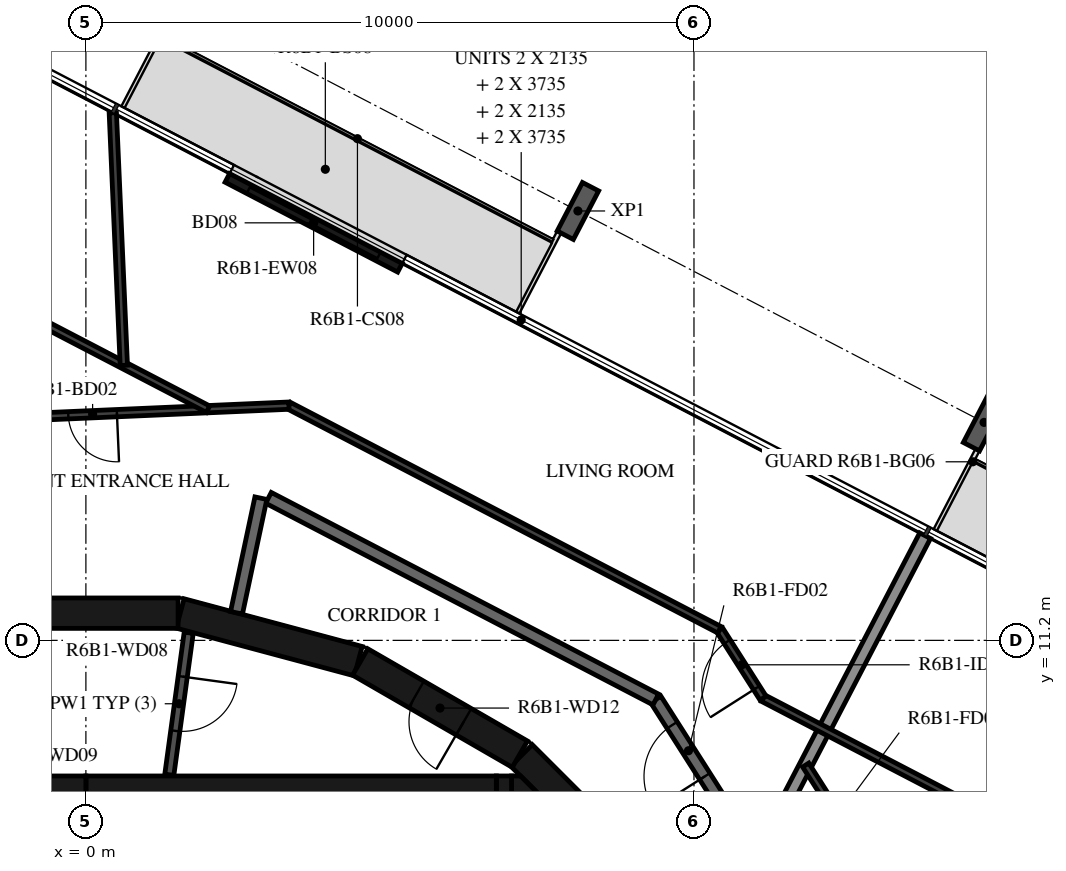
"""IFC4 building model, lengths in metres.
Left out: names, types, materials, properties, quantities, classifications, styles, units other than length and angle.
Written with IfcOpenShell. Run it as: python <this file> out.ifc"""

import sys

from ifc_helpers import new_model, si_unit, direction, frame, frame_2d, origin, origin_2d, place, context, subcontext, project, spatial, polyline, rectangle, i_section, outline, extrude, element, fill, save


model = new_model("IFC4")
c1 = context("Model", 3, precision=1e-05, world=origin(), true_north=direction((0.0, 1.0)))
c2 = subcontext(c1, "Body", "Model", "MODEL_VIEW")
j1 = project(units=[si_unit("LENGTHUNIT", "METRE"), si_unit("PLANEANGLEUNIT", "RADIAN")], contexts=[c1])
p1 = place(None, origin())
s1 = spatial("IfcSite", under=j1, at=p1, CompositionType="ELEMENT")
p2 = place(p1, origin())
s2 = spatial("IfcBuilding", under=s1, at=p2, CompositionType="ELEMENT")
p3 = place(p2, frame((0.0, 0.0, 237.2)))
s3 = spatial("IfcBuildingStorey", under=s2, at=p3, CompositionType="ELEMENT", Elevation=237.2)
for number, where, z_axis, x_axis in (
    (1, (14.771, 14.784, -0.38), (0.0, 0.0, 1.0), (0.887, -0.462, 0.0)),
    (2, (8.091, 18.261, -0.38), (0.0, 0.0, 1.0), (0.887, -0.462, 0.0)),
):
    element("IfcColumn", number, at=place(p3, frame(where, z_axis=z_axis, x_axis=x_axis)), inside=s3, PredefinedType="COLUMN", context=c2, shape_type="SweptSolid", body=[
        extrude(i_section(OverallWidth=0.3, OverallDepth=0.9, WebThickness=0.019, FlangeThickness=0.035, FilletRadius=0.03, at=origin_2d()), origin(), (0.0, 0.0, 1.0), 3.5),
    ])
p4 = place(p3, frame((5.164, 17.327, 0.0), z_axis=(0.0, 0.0, 1.0), x_axis=(-0.886983100078, 0.461801884119, 0.0)))
e3 = element("IfcWall", 3, at=p4, inside=s3, PredefinedType="STANDARD", context=c2, shape_type="SweptSolid", body=[
    extrude(rectangle(XDim=3.2, YDim=0.16, at=frame_2d((1.6, 0.0))), origin(), (0.0, 0.0, 1.0), 3.12),
])
p5 = place(p4, frame((0.4, 0.0, 0.0)))
e4 = element("IfcOpeningElement", 4, at=p5, cuts=e3, PredefinedType="OPENING", context=c2, shape_type="SweptSolid", body=[
    extrude(rectangle(XDim=2.4, YDim=2.4, at=frame_2d((1.2, 1.2))), frame((0.0, 0.09, 0.0), z_axis=(0.0, -1.0, 0.0), x_axis=(1.0, 0.0, 0.0)), (0.0, 0.0, 1.0), 0.18),
])
p6 = place(p3, frame((9.308, 7.164, 0.0), z_axis=(0.0, 0.0, 1.0), x_axis=(-0.707106781187, 0.707106781187, 0.0)))
e5 = element("IfcWall", 5, at=p6, inside=s3, PredefinedType="SHEAR", context=c2, shape_type="SweptSolid", body=[
    extrude(rectangle(XDim=3.032, YDim=0.5, at=frame_2d((1.516, 0.0))), origin(), (0.0, 0.0, 1.0), 3.12),
])
p7 = place(p6, frame((0.416, 0.0, 0.0)))
e6 = element("IfcOpeningElement", 6, at=p7, cuts=e5, PredefinedType="OPENING", context=c2, shape_type="SweptSolid", body=[
    extrude(rectangle(XDim=1.2, YDim=2.1, at=frame_2d((0.6, 1.05))), frame((0.0, 0.26, 0.0), z_axis=(0.0, -1.0, 0.0), x_axis=(1.0, 0.0, 0.0)), (0.0, 0.0, 1.0), 0.52),
])
p8 = place(p3, frame((7.137, 9.329, 0.0), z_axis=(0.0, 0.0, 1.0), x_axis=(-0.865975092491, 0.500087131594, 0.0)))
e7 = element("IfcWall", 7, at=p8, inside=s3, PredefinedType="SHEAR", context=c2, shape_type="SweptSolid", body=[
    extrude(rectangle(XDim=3.033, YDim=0.5, at=frame_2d((1.516, 0.0))), origin(), (0.0, 0.0, 1.0), 3.12),
])
p9 = place(p8, frame((1.066, 0.0, 0.0)))
e8 = element("IfcOpeningElement", 8, at=p9, cuts=e7, PredefinedType="OPENING", context=c2, shape_type="SweptSolid", body=[
    extrude(rectangle(XDim=0.9, YDim=2.1, at=frame_2d((0.45, 1.05))), frame((0.0, 0.26, 0.0), z_axis=(0.0, -1.0, 0.0), x_axis=(1.0, 0.0, 0.0)), (0.0, 0.0, 1.0), 0.52),
])
for number, where, z_axis, x_axis in (
    (9, (4.479, 10.858, 0.0), (0.0, 0.0, 1.0), (-0.966, 0.259, 0.0)),
    (10, (1.516, 11.647, 0.0), (0.0, 0.0, 1.0), (-1.0, 0.0, 0.0)),
):
    element("IfcWall", number, at=place(p3, frame(where, z_axis=z_axis, x_axis=x_axis)), inside=s3, PredefinedType="SHEAR", context=c2, shape_type="SweptSolid", body=[
        extrude(rectangle(XDim=3.033, YDim=0.5, at=frame_2d((1.516, 0.0))), origin(), (0.0, 0.0, 1.0), 3.12),
    ])
p10 = place(p3, frame((0.0, 8.82, 0.0), z_axis=(0.0, 0.0, 1.0), x_axis=(1.0, 0.0, 0.0)))
e11 = element("IfcWall", 11, at=p10, inside=s3, PredefinedType="SHEAR", context=c2, shape_type="SweptSolid", body=[
    extrude(rectangle(XDim=6.75, YDim=0.3, at=frame_2d((3.375, 0.0))), origin(), (0.0, 0.0, 1.0), 3.12),
])
p11 = place(p3, frame((6.875, 5.05, 0.0), z_axis=(0.0, 0.0, 1.0), x_axis=(0.0, 1.0, 0.0)))
e12 = element("IfcWall", 12, at=p11, inside=s3, PredefinedType="SHEAR", context=c2, shape_type="SweptSolid", body=[
    extrude(rectangle(XDim=3.92, YDim=0.25, at=frame_2d((1.96, 0.0))), origin(), (0.0, 0.0, 1.0), 3.12),
])
p12 = place(p11, frame((1.11, 0.0, 0.0)))
e13 = element("IfcOpeningElement", 13, at=p12, cuts=e12, PredefinedType="OPENING", context=c2, shape_type="SweptSolid", body=[
    extrude(rectangle(XDim=1.2, YDim=2.1, at=frame_2d((0.6, 1.05))), frame((0.0, 0.135, 0.0), z_axis=(0.0, -1.0, 0.0), x_axis=(1.0, 0.0, 0.0)), (0.0, 0.0, 1.0), 0.27),
])
p13 = place(p3, origin())
e14 = element("IfcWall", 14, at=p13, inside=s3, PredefinedType="SHEAR", context=c2, shape_type="SweptSolid", body=[
    extrude(outline(polyline([(7.448, 8.67), (7.0, 8.67), (7.0, 8.97), (7.148, 8.97), (7.448, 8.67)])), origin(), (0.0, 0.0, 1.0), 3.12),
])
p14 = place(p3, frame((-6.75, 8.82, 0.0), z_axis=(0.0, 0.0, 1.0), x_axis=(1.0, 0.0, 0.0)))
e15 = element("IfcWall", 15, at=p14, inside=s3, PredefinedType="SHEAR", context=c2, shape_type="SweptSolid", body=[
    extrude(rectangle(XDim=6.75, YDim=0.3, at=frame_2d((3.375, 0.0))), origin(), (0.0, 0.0, 1.0), 3.12),
])
p15 = place(p3, frame((1.691, 11.326, 0.0), z_axis=(0.0, 0.0, 1.0), x_axis=(-0.135344253201, -0.990798633994, 0.0)))
e16 = element("IfcWall", 16, at=p15, inside=s3, PredefinedType="PARTITIONING", context=c2, shape_type="SweptSolid", body=[
    extrude(rectangle(XDim=2.358, YDim=0.15, at=frame_2d((1.179, 0.0))), origin(), (0.0, 0.0, 1.0), 3.12),
])
p16 = place(p15, frame((0.729, 0.0, 0.0)))
e17 = element("IfcOpeningElement", 17, at=p16, cuts=e16, PredefinedType="OPENING", context=c2, shape_type="SweptSolid", body=[
    extrude(rectangle(XDim=0.9, YDim=2.1, at=frame_2d((0.45, 1.05))), frame((0.0, 0.085, 0.0), z_axis=(0.0, -1.0, 0.0), x_axis=(1.0, 0.0, 0.0)), (0.0, 0.0, 1.0), 0.17),
])
p17 = place(p3, frame((13.231, 4.172, 0.0), z_axis=(0.0, 0.0, 1.0), x_axis=(-0.537304397561, 0.843388394728, 0.0)))
e18 = element("IfcWall", 18, at=p17, inside=s3, PredefinedType="STANDARD", context=c2, shape_type="SweptSolid", body=[
    extrude(rectangle(XDim=7.181, YDim=0.2, at=frame_2d((3.59, 0.0))), origin(), (0.0, 0.0, 1.0), 3.12),
])
p18 = place(p17, frame((2.881, 0.0, 0.0)))
e19 = element("IfcOpeningElement", 19, at=p18, cuts=e18, PredefinedType="OPENING", context=c2, shape_type="SweptSolid", body=[
    extrude(rectangle(XDim=1.0, YDim=2.1, at=frame_2d((0.5, 1.05))), frame((0.0, 0.11, 0.0), z_axis=(0.0, -1.0, 0.0), x_axis=(1.0, 0.0, 0.0)), (0.0, 0.0, 1.0), 0.22),
])
p19 = place(p17, frame((5.681, 0.0, 0.0)))
e20 = element("IfcOpeningElement", 20, at=p19, cuts=e18, PredefinedType="OPENING", context=c2, shape_type="SweptSolid", body=[
    extrude(rectangle(XDim=1.0, YDim=2.1, at=frame_2d((0.5, 1.05))), frame((0.0, 0.11, 0.0), z_axis=(0.0, -1.0, 0.0), x_axis=(1.0, 0.0, 0.0)), (0.0, 0.0, 1.0), 0.22),
])
p20 = place(p3, frame((9.372, 10.228, 0.0), z_axis=(0.0, 0.0, 1.0), x_axis=(-0.887005184532, 0.461759464021, 0.0)))
e21 = element("IfcWall", 21, at=p20, inside=s3, PredefinedType="STANDARD", context=c2, shape_type="SweptSolid", body=[
    extrude(rectangle(XDim=7.181, YDim=0.2, at=frame_2d((3.591, 0.0))), origin(), (0.0, 0.0, 1.0), 3.12),
])
p21 = place(p3, frame((2.878, 13.538, 0.0), z_axis=(0.0, 0.0, 1.0), x_axis=(-0.207893604596, -0.978151444904, 0.0)))
e22 = element("IfcWall", 22, at=p21, inside=s3, PredefinedType="STANDARD", context=c2, shape_type="SweptSolid", body=[
    extrude(rectangle(XDim=1.927, YDim=0.2, at=frame_2d((0.963, 0.0))), origin(), (0.0, 0.0, 1.0), 3.12),
])
p22 = place(p3, frame((13.801, 12.922, 0.0), z_axis=(0.0, 0.0, 1.0), x_axis=(-0.461726485624, -0.887022351733, 0.0)))
e23 = element("IfcWall", 23, at=p22, inside=s3, PredefinedType="STANDARD", context=c2, shape_type="SweptSolid", body=[
    extrude(rectangle(XDim=5.984, YDim=0.2, at=frame_2d((2.992, 0.0))), origin(), (0.0, 0.0, 1.0), 2.73),
])
p23 = place(p3, frame((14.58, 4.845, 0.0), z_axis=(0.0, 0.0, 1.0), x_axis=(-0.537283960997, 0.84340141407, 0.0)))
e24 = element("IfcWall", 24, at=p23, inside=s3, PredefinedType="PARTITIONING", context=c2, shape_type="SweptSolid", body=[
    extrude(rectangle(XDim=5.104, YDim=0.12, at=frame_2d((2.552, 0.0))), origin(), (0.0, 0.0, 1.0), 3.12),
])
p24 = place(p23, frame((0.2, 0.0, 0.0)))
e25 = element("IfcOpeningElement", 25, at=p24, cuts=e24, PredefinedType="OPENING", context=c2, shape_type="SweptSolid", body=[
    extrude(rectangle(XDim=0.8, YDim=2.1, at=frame_2d((0.4, 1.05))), frame((0.0, 0.07, 0.0), z_axis=(0.0, -1.0, 0.0), x_axis=(1.0, 0.0, 0.0)), (0.0, 0.0, 1.0), 0.14),
])
p25 = place(p3, frame((21.496, 4.858, 0.0), z_axis=(0.0, 0.0, 1.0), x_axis=(-0.887020940825, 0.461729196107, 0.0)))
e26 = element("IfcWall", 26, at=p25, inside=s3, PredefinedType="PARTITIONING", context=c2, shape_type="SweptSolid", body=[
    extrude(rectangle(XDim=11.678, YDim=0.12, at=frame_2d((5.839, 0.0))), origin(), (0.0, 0.0, 1.0), 3.12),
])
p26 = place(p25, frame((1.251, 0.0, 0.0)))
e27 = element("IfcOpeningElement", 27, at=p26, cuts=e26, PredefinedType="OPENING", context=c2, shape_type="SweptSolid", body=[
    extrude(rectangle(XDim=0.9, YDim=2.1, at=frame_2d((0.45, 1.05))), frame((0.0, 0.07, 0.0), z_axis=(0.0, -1.0, 0.0), x_axis=(1.0, 0.0, 0.0)), (0.0, 0.0, 1.0), 0.14),
])
p27 = place(p25, frame((3.341, 0.0, 0.0)))
e28 = element("IfcOpeningElement", 28, at=p27, cuts=e26, PredefinedType="OPENING", context=c2, shape_type="SweptSolid", body=[
    extrude(rectangle(XDim=0.9, YDim=2.1, at=frame_2d((0.45, 1.05))), frame((0.0, 0.07, 0.0), z_axis=(0.0, -1.0, 0.0), x_axis=(1.0, 0.0, 0.0)), (0.0, 0.0, 1.0), 0.14),
])
p28 = place(p3, frame((11.137, 10.25, 0.0), z_axis=(0.0, 0.0, 1.0), x_axis=(-0.537231369635, 0.843434914786, 0.0)))
e29 = element("IfcWall", 29, at=p28, inside=s3, PredefinedType="PARTITIONING", context=c2, shape_type="SweptSolid", body=[
    extrude(rectangle(XDim=1.332, YDim=0.12, at=frame_2d((0.666, 0.0))), origin(), (0.0, 0.0, 1.0), 3.12),
])
p29 = place(p28, frame((0.2, 0.0, 0.0)))
e30 = element("IfcOpeningElement", 30, at=p29, cuts=e29, PredefinedType="OPENING", context=c2, shape_type="SweptSolid", body=[
    extrude(rectangle(XDim=0.9, YDim=2.1, at=frame_2d((0.45, 1.05))), frame((0.0, 0.07, 0.0), z_axis=(0.0, -1.0, 0.0), x_axis=(1.0, 0.0, 0.0)), (0.0, 0.0, 1.0), 0.14),
])
p30 = place(p3, frame((10.421, 11.373, 0.0), z_axis=(0.0, 0.0, 1.0), x_axis=(-0.887012970857, 0.461744506769, 0.0)))
e31 = element("IfcWall", 31, at=p30, inside=s3, PredefinedType="PARTITIONING", context=c2, shape_type="SweptSolid", body=[
    extrude(rectangle(XDim=7.985, YDim=0.12, at=frame_2d((3.992, 0.0))), origin(), (0.0, 0.0, 1.0), 3.12),
])
p31 = place(p3, frame((3.339, 15.06, 0.0), z_axis=(0.0, 0.0, 1.0), x_axis=(-0.999047716945, -0.043630943905, 0.0)))
e32 = element("IfcWall", 32, at=p31, inside=s3, PredefinedType="PARTITIONING", context=c2, shape_type="SweptSolid", body=[
    extrude(rectangle(XDim=7.985, YDim=0.12, at=frame_2d((3.992, 0.0))), origin(), (0.0, 0.0, 1.0), 3.12),
])
p32 = place(p31, frame((2.831, 0.0, 0.0)))
e33 = element("IfcOpeningElement", 33, at=p32, cuts=e32, PredefinedType="OPENING", context=c2, shape_type="SweptSolid", body=[
    extrude(rectangle(XDim=0.8, YDim=2.1, at=frame_2d((0.4, 1.05))), frame((0.0, 0.07, 0.0), z_axis=(0.0, -1.0, 0.0), x_axis=(1.0, 0.0, 0.0)), (0.0, 0.0, 1.0), 0.14),
])
p33 = place(p3, frame((-8.35, 20.394, 0.0), z_axis=(0.0, 0.0, 1.0), x_axis=(0.887020940825, -0.461729196107, 0.0)))
e34 = element("IfcWall", 34, at=p33, inside=s3, PredefinedType="PARTITIONING", context=c2, shape_type="SweptSolid", body=[
    extrude(rectangle(XDim=11.678, YDim=0.12, at=frame_2d((5.839, 0.0))), origin(), (0.0, 0.0, 1.0), 3.12),
])
p34 = place(p33, frame((3.469, 0.0, 0.0)))
e35 = element("IfcOpeningElement", 35, at=p34, cuts=e34, PredefinedType="OPENING", context=c2, shape_type="SweptSolid", body=[
    extrude(rectangle(XDim=0.9, YDim=2.1, at=frame_2d((0.45, 1.05))), frame((0.0, 0.07, 0.0), z_axis=(0.0, -1.0, 0.0), x_axis=(1.0, 0.0, 0.0)), (0.0, 0.0, 1.0), 0.14),
])
p35 = place(p3, frame((0.442, 19.876, 0.0), z_axis=(0.0, 0.0, 1.0), x_axis=(0.043638577658, -0.999047383531, 0.0)))
e36 = element("IfcWall", 36, at=p35, inside=s3, PredefinedType="PARTITIONING", context=c2, shape_type="SweptSolid", body=[
    extrude(rectangle(XDim=4.157, YDim=0.12, at=frame_2d((2.078, 0.0))), origin(), (0.0, 0.0, 1.0), 3.12),
])
p36 = place(p5, origin())
e37 = element("IfcDoor", 37, at=p36, inside=s3, OperationType="DOUBLE_DOOR_SLIDING", PredefinedType="DOOR", context=c2, shape_type="SweptSolid", body=[
    extrude(rectangle(XDim=2.4, YDim=2.4, at=frame_2d((1.2, 1.2))), frame((0.0, 0.025, 0.0), z_axis=(0.0, -1.0, 0.0), x_axis=(1.0, 0.0, 0.0)), (0.0, 0.0, 1.0), 0.05),
])
fill(e4, e37)
p37 = place(p16, origin())
e38 = element("IfcDoor", 38, at=p37, inside=s3, OperationType="SINGLE_SWING_RIGHT", PredefinedType="DOOR", context=c2, shape_type="SweptSolid", body=[
    extrude(rectangle(XDim=0.9, YDim=2.1, at=frame_2d((0.45, 1.05))), frame((0.0, 0.025, 0.0), z_axis=(0.0, -1.0, 0.0), x_axis=(1.0, 0.0, 0.0)), (0.0, 0.0, 1.0), 0.05),
])
fill(e17, e38)
p38 = place(p9, origin())
e39 = element("IfcDoor", 39, at=p38, inside=s3, OperationType="SINGLE_SWING_RIGHT", PredefinedType="DOOR", context=c2, shape_type="SweptSolid", body=[
    extrude(rectangle(XDim=0.9, YDim=2.1, at=frame_2d((0.45, 1.05))), frame((0.0, 0.025, 0.0), z_axis=(0.0, -1.0, 0.0), x_axis=(1.0, 0.0, 0.0)), (0.0, 0.0, 1.0), 0.05),
])
fill(e8, e39)
p39 = place(p19, origin())
e40 = element("IfcDoor", 40, at=p39, inside=s3, OperationType="SINGLE_SWING_LEFT", PredefinedType="DOOR", context=c2, shape_type="SweptSolid", body=[
    extrude(rectangle(XDim=1.0, YDim=2.1, at=frame_2d((0.5, 1.05))), frame((0.0, 0.025, 0.0), z_axis=(0.0, -1.0, 0.0), x_axis=(1.0, 0.0, 0.0)), (0.0, 0.0, 1.0), 0.05),
])
fill(e20, e40)
p40 = place(p29, origin())
e41 = element("IfcDoor", 41, at=p40, inside=s3, OperationType="SINGLE_SWING_LEFT", PredefinedType="DOOR", context=c2, shape_type="SweptSolid", body=[
    extrude(rectangle(XDim=0.9, YDim=2.1, at=frame_2d((0.45, 1.05))), frame((0.0, 0.025, 0.0), z_axis=(0.0, -1.0, 0.0), x_axis=(1.0, 0.0, 0.0)), (0.0, 0.0, 1.0), 0.05),
])
fill(e30, e41)
p41 = place(p32, origin())
e42 = element("IfcDoor", 42, at=p41, inside=s3, OperationType="SINGLE_SWING_RIGHT", PredefinedType="DOOR", context=c2, shape_type="SweptSolid", body=[
    extrude(rectangle(XDim=0.8, YDim=2.1, at=frame_2d((0.4, 1.05))), frame((0.0, 0.025, 0.0), z_axis=(0.0, -1.0, 0.0), x_axis=(1.0, 0.0, 0.0)), (0.0, 0.0, 1.0), 0.05),
])
fill(e33, e42)
save(model, sys.argv[1])
